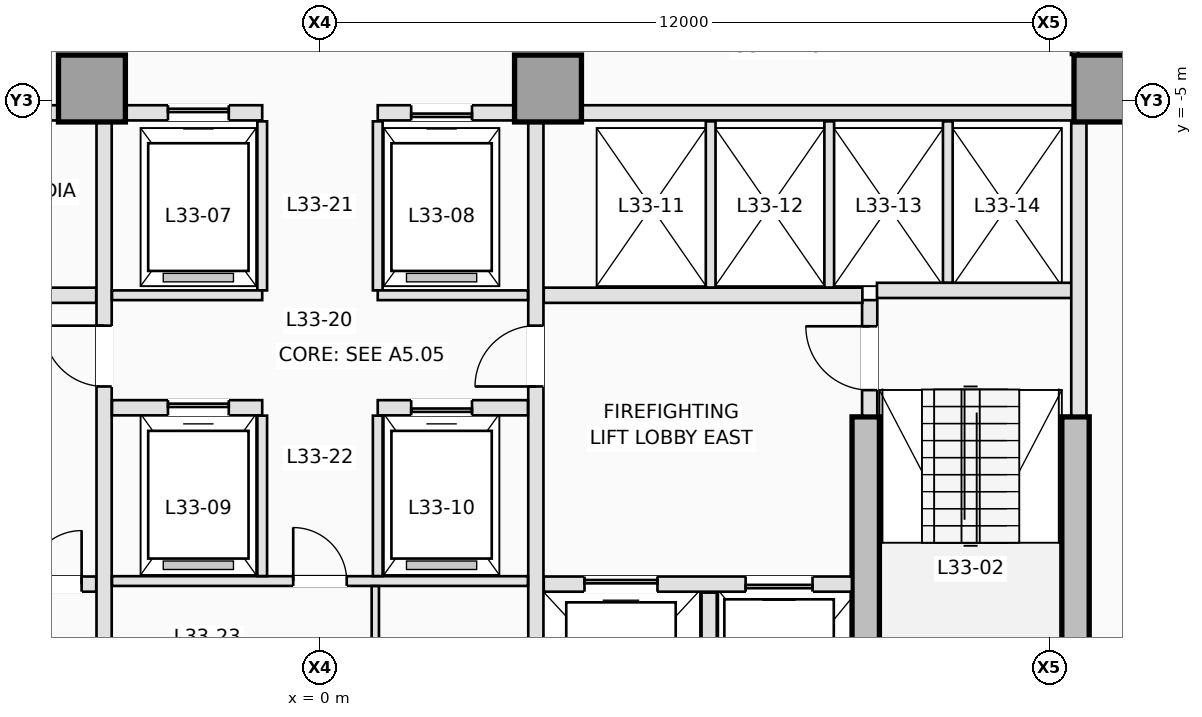
"""IFC4 building model, lengths in metres.
Left out: names, types, materials, properties, quantities, classifications, styles, units other than length and angle.
Written with IfcOpenShell. Run it as: python <this file> out.ifc"""

import sys

from ifc_helpers import new_model, si_unit, direction, frame, frame_2d, origin, origin_2d, place, context, subcontext, project, spatial, rectangle, extrude, element, fill, save


model = new_model("IFC4")
c1 = context("Model", 3, precision=1e-05, world=origin(), true_north=direction((0.0, 1.0)))
c2 = subcontext(c1, "Body", "Model", "MODEL_VIEW")
j1 = project(units=[si_unit("LENGTHUNIT", "METRE"), si_unit("PLANEANGLEUNIT", "RADIAN")], contexts=[c1])
p1 = place(None, origin())
s1 = spatial("IfcSite", under=j1, at=p1, CompositionType="ELEMENT")
p2 = place(p1, origin())
s2 = spatial("IfcBuilding", under=s1, at=p2, CompositionType="ELEMENT")
p3 = place(p2, frame((0.0, 0.0, 123.0)))
s3 = spatial("IfcBuildingStorey", under=s2, at=p3, CompositionType="ELEMENT", Elevation=123.0)
p4 = place(p3, frame((12.425, -15.725, 0.0), z_axis=(0.0, 0.0, 1.0), x_axis=(0.0, 1.0, 0.0)))
e1 = element("IfcWall", 1, at=p4, inside=s3, PredefinedType="SHEAR", context=c2, shape_type="SweptSolid", body=[
    extrude(rectangle(XDim=5.525, YDim=0.45, at=frame_2d((2.763, 0.0))), origin(), (0.0, 0.0, 1.0), 3.5),
])
p5 = place(p3, frame((8.975, -16.15, 0.0), z_axis=(0.0, 0.0, 1.0), x_axis=(0.0, 1.0, 0.0)))
e2 = element("IfcWall", 2, at=p5, inside=s3, PredefinedType="SHEAR", context=c2, shape_type="SweptSolid", body=[
    extrude(rectangle(XDim=5.95, YDim=0.45, at=frame_2d((2.975, 0.0))), origin(), (0.0, 0.0, 1.0), 3.5),
])
for number, where, z_axis, x_axis in (
    (3, (-3.75, -4.8, 0.0), (0.0, 0.0, 1.0), (1.0, 0.0, 0.0)),
    (4, (3.75, -4.8, 0.0), (0.0, 0.0, 1.0), (1.0, 0.0, 0.0)),
    (5, (12.95, -4.8, 0.0), (0.0, 0.0, 1.0), (1.0, 0.0, 0.0)),
):
    element("IfcColumn", number, at=place(p3, frame(where, z_axis=z_axis, x_axis=x_axis)), inside=s3, PredefinedType="COLUMN", context=c2, shape_type="SweptSolid", body=[
        extrude(rectangle(XDim=1.1, YDim=1.1, at=origin_2d()), origin(), (0.0, 0.0, 1.0), 3.5),
    ])
p6 = place(p3, frame((9.04, -10.18, 0.0), z_axis=(0.0, 0.0, 1.0), x_axis=(0.0, 1.0, 0.0)))
e6 = element("IfcWall", 6, at=p6, inside=s3, PredefinedType="PARTITIONING", context=c2, shape_type="SweptSolid", body=[
    extrude(rectangle(XDim=1.9, YDim=0.25, at=frame_2d((0.95, 0.0))), origin(), (0.0, 0.0, 1.0), 3.25),
])
p7 = place(p6, frame((0.42, 0.0, 0.0)))
e7 = element("IfcOpeningElement", 7, at=p7, cuts=e6, PredefinedType="OPENING", context=c2, shape_type="SweptSolid", body=[
    extrude(rectangle(XDim=1.05, YDim=2.15, at=frame_2d((0.525, 1.075))), frame((0.0, 0.135, 0.0), z_axis=(0.0, -1.0, 0.0), x_axis=(1.0, 0.0, 0.0)), (0.0, 0.0, 1.0), 0.27),
])
p8 = place(p3, frame((9.16, -8.12, 0.0), z_axis=(0.0, 0.0, 1.0), x_axis=(1.0, 0.0, 0.0)))
e8 = element("IfcWall", 8, at=p8, inside=s3, PredefinedType="PARTITIONING", context=c2, shape_type="SweptSolid", body=[
    extrude(rectangle(XDim=3.22, YDim=0.25, at=frame_2d((1.61, 0.0))), origin(), (0.0, 0.0, 1.0), 3.25),
])
p9 = place(p3, frame((12.48, -10.18, 0.0), z_axis=(0.0, 0.0, 1.0), x_axis=(0.0, 1.0, 0.0)))
e9 = element("IfcWall", 9, at=p9, inside=s3, PredefinedType="PARTITIONING", context=c2, shape_type="SweptSolid", body=[
    extrude(rectangle(XDim=4.828, YDim=0.25, at=frame_2d((2.414, 0.0))), origin(), (0.0, 0.0, 1.0), 3.25),
])
p10 = place(p3, frame((-8.748, -12.95, 0.0), z_axis=(0.0, 0.0, 1.0), x_axis=(1.0, 0.0, 0.0)))
e10 = element("IfcWall", 10, at=p10, inside=s3, PredefinedType="PARTITIONING", context=c2, shape_type="SweptSolid", body=[
    extrude(rectangle(XDim=5.068, YDim=0.25, at=frame_2d((2.534, 0.0))), origin(), (0.0, 0.0, 1.0), 3.25),
])
p11 = place(p10, frame((0.648, 0.0, 0.0)))
e11 = element("IfcOpeningElement", 11, at=p11, cuts=e10, PredefinedType="OPENING", context=c2, shape_type="SweptSolid", body=[
    extrude(rectangle(XDim=1.1, YDim=2.15, at=frame_2d((0.55, 1.075))), frame((0.0, 0.135, 0.0), z_axis=(0.0, -1.0, 0.0), x_axis=(1.0, 0.0, 0.0)), (0.0, 0.0, 1.0), 0.27),
])
p12 = place(p10, frame((2.548, 0.0, 0.0)))
e12 = element("IfcOpeningElement", 12, at=p12, cuts=e10, PredefinedType="OPENING", context=c2, shape_type="SweptSolid", body=[
    extrude(rectangle(XDim=0.88, YDim=2.1, at=frame_2d((0.44, 1.05))), frame((0.0, 0.135, 0.0), z_axis=(0.0, -1.0, 0.0), x_axis=(1.0, 0.0, 0.0)), (0.0, 0.0, 1.0), 0.27),
])
p13 = place(p10, frame((3.948, 0.0, 0.0)))
e13 = element("IfcOpeningElement", 13, at=p13, cuts=e10, PredefinedType="OPENING", context=c2, shape_type="SweptSolid", body=[
    extrude(rectangle(XDim=0.88, YDim=2.1, at=frame_2d((0.44, 1.05))), frame((0.0, 0.135, 0.0), z_axis=(0.0, -1.0, 0.0), x_axis=(1.0, 0.0, 0.0)), (0.0, 0.0, 1.0), 0.27),
])
p14 = place(p3, frame((3.68, -12.95, 0.0), z_axis=(0.0, 0.0, 1.0), x_axis=(1.0, 0.0, 0.0)))
e14 = element("IfcWall", 14, at=p14, inside=s3, PredefinedType="PARTITIONING", context=c2, shape_type="SweptSolid", body=[
    extrude(rectangle(XDim=5.068, YDim=0.25, at=frame_2d((2.534, 0.0))), origin(), (0.0, 0.0, 1.0), 3.25),
])
p15 = place(p14, frame((3.32, 0.0, 0.0)))
e15 = element("IfcOpeningElement", 15, at=p15, cuts=e14, PredefinedType="OPENING", context=c2, shape_type="SweptSolid", body=[
    extrude(rectangle(XDim=1.1, YDim=2.15, at=frame_2d((0.55, 1.075))), frame((0.0, 0.135, 0.0), z_axis=(0.0, -1.0, 0.0), x_axis=(1.0, 0.0, 0.0)), (0.0, 0.0, 1.0), 0.27),
])
p16 = place(p14, frame((0.67, 0.0, 0.0)))
e16 = element("IfcOpeningElement", 16, at=p16, cuts=e14, PredefinedType="OPENING", context=c2, shape_type="SweptSolid", body=[
    extrude(rectangle(XDim=1.2, YDim=2.15, at=frame_2d((0.6, 1.075))), frame((0.0, 0.135, 0.0), z_axis=(0.0, -1.0, 0.0), x_axis=(1.0, 0.0, 0.0)), (0.0, 0.0, 1.0), 0.27),
])
p17 = place(p3, frame((6.4, -15.92, 0.0), z_axis=(0.0, 0.0, 1.0), x_axis=(0.0, 1.0, 0.0)))
e17 = element("IfcWall", 17, at=p17, inside=s3, PredefinedType="PARTITIONING", context=c2, shape_type="SweptSolid", body=[
    extrude(rectangle(XDim=2.83, YDim=0.25, at=frame_2d((1.415, 0.0))), origin(), (0.0, 0.0, 1.0), 3.25),
])
for number, where, z_axis, x_axis in (
    (18, (-8.92, -8.2, 0.0), (0.0, 0.0, 1.0), (1.0, 0.0, 0.0)),
    (19, (3.68, -8.2, 0.0), (0.0, 0.0, 1.0), (1.0, 0.0, 0.0)),
):
    element("IfcWall", number, at=place(p3, frame(where, z_axis=z_axis, x_axis=x_axis)), inside=s3, PredefinedType="PARTITIONING", context=c2, shape_type="SweptSolid", body=[
        extrude(rectangle(XDim=5.24, YDim=0.25, at=frame_2d((2.62, 0.0))), origin(), (0.0, 0.0, 1.0), 3.25),
    ])
p18 = place(p3, frame((-3.55, -15.798, 0.0), z_axis=(0.0, 0.0, 1.0), x_axis=(0.0, 1.0, 0.0)))
e20 = element("IfcWall", 20, at=p18, inside=s3, PredefinedType="PARTITIONING", context=c2, shape_type="SweptSolid", body=[
    extrude(rectangle(XDim=10.446, YDim=0.25, at=frame_2d((5.223, 0.0))), origin(), (0.0, 0.0, 1.0), 3.25),
])
p19 = place(p18, frame((6.098, 0.0, 0.0)))
e21 = element("IfcOpeningElement", 21, at=p19, cuts=e20, PredefinedType="OPENING", context=c2, shape_type="SweptSolid", body=[
    extrude(rectangle(XDim=1.0, YDim=2.15, at=frame_2d((0.5, 1.075))), frame((0.0, 0.135, 0.0), z_axis=(0.0, -1.0, 0.0), x_axis=(1.0, 0.0, 0.0)), (0.0, 0.0, 1.0), 0.27),
])
p20 = place(p3, frame((3.55, -15.798, 0.0), z_axis=(0.0, 0.0, 1.0), x_axis=(0.0, 1.0, 0.0)))
e22 = element("IfcWall", 22, at=p20, inside=s3, PredefinedType="PARTITIONING", context=c2, shape_type="SweptSolid", body=[
    extrude(rectangle(XDim=10.446, YDim=0.25, at=frame_2d((5.223, 0.0))), origin(), (0.0, 0.0, 1.0), 3.25),
])
p21 = place(p20, frame((6.098, 0.0, 0.0)))
e23 = element("IfcOpeningElement", 23, at=p21, cuts=e22, PredefinedType="OPENING", context=c2, shape_type="SweptSolid", body=[
    extrude(rectangle(XDim=1.0, YDim=2.15, at=frame_2d((0.5, 1.075))), frame((0.0, 0.135, 0.0), z_axis=(0.0, -1.0, 0.0), x_axis=(1.0, 0.0, 0.0)), (0.0, 0.0, 1.0), 0.27),
])
p22 = place(p3, frame((-12.398, -5.2, 0.0), z_axis=(0.0, 0.0, 1.0), x_axis=(1.0, 0.0, 0.0)))
e24 = element("IfcWall", 24, at=p22, inside=s3, PredefinedType="PARTITIONING", context=c2, shape_type="SweptSolid", body=[
    extrude(rectangle(XDim=8.096, YDim=0.25, at=frame_2d((4.048, 0.0))), origin(), (0.0, 0.0, 1.0), 3.25),
])
p23 = place(p22, frame((2.968, 0.0, 0.0)))
e25 = element("IfcOpeningElement", 25, at=p23, cuts=e24, PredefinedType="OPENING", context=c2, shape_type="SweptSolid", body=[
    extrude(rectangle(XDim=0.92, YDim=2.12, at=frame_2d((0.46, 1.06))), frame((0.0, 0.135, 0.0), z_axis=(0.0, -1.0, 0.0), x_axis=(1.0, 0.0, 0.0)), (0.0, 0.0, 1.0), 0.27),
])
p24 = place(p22, frame((6.068, 0.0, 0.0)))
e26 = element("IfcOpeningElement", 26, at=p24, cuts=e24, PredefinedType="OPENING", context=c2, shape_type="SweptSolid", body=[
    extrude(rectangle(XDim=0.92, YDim=2.12, at=frame_2d((0.46, 1.06))), frame((0.0, 0.135, 0.0), z_axis=(0.0, -1.0, 0.0), x_axis=(1.0, 0.0, 0.0)), (0.0, 0.0, 1.0), 0.27),
])
p25 = place(p3, frame((4.302, -5.2, 0.0), z_axis=(0.0, 0.0, 1.0), x_axis=(1.0, 0.0, 0.0)))
e27 = element("IfcWall", 27, at=p25, inside=s3, PredefinedType="PARTITIONING", context=c2, shape_type="SweptSolid", body=[
    extrude(rectangle(XDim=8.096, YDim=0.25, at=frame_2d((4.048, 0.0))), origin(), (0.0, 0.0, 1.0), 3.25),
])
p26 = place(p3, frame((-3.198, -5.2, 0.0), z_axis=(0.0, 0.0, 1.0), x_axis=(1.0, 0.0, 0.0)))
e28 = element("IfcWall", 28, at=p26, inside=s3, PredefinedType="PARTITIONING", context=c2, shape_type="SweptSolid", body=[
    extrude(rectangle(XDim=2.248, YDim=0.25, at=frame_2d((1.124, 0.0))), origin(), (0.0, 0.0, 1.0), 3.25),
])
p27 = place(p26, frame((0.698, 0.0, 0.0)))
e29 = element("IfcOpeningElement", 29, at=p27, cuts=e28, PredefinedType="OPENING", context=c2, shape_type="SweptSolid", body=[
    extrude(rectangle(XDim=1.0, YDim=2.15, at=frame_2d((0.5, 1.075))), frame((0.0, 0.135, 0.0), z_axis=(0.0, -1.0, 0.0), x_axis=(1.0, 0.0, 0.0)), (0.0, 0.0, 1.0), 0.27),
])
p28 = place(p3, frame((0.95, -5.2, 0.0), z_axis=(0.0, 0.0, 1.0), x_axis=(1.0, 0.0, 0.0)))
e30 = element("IfcWall", 30, at=p28, inside=s3, PredefinedType="PARTITIONING", context=c2, shape_type="SweptSolid", body=[
    extrude(rectangle(XDim=2.248, YDim=0.25, at=frame_2d((1.124, 0.0))), origin(), (0.0, 0.0, 1.0), 3.25),
])
p29 = place(p28, frame((0.55, 0.0, 0.0)))
e31 = element("IfcOpeningElement", 31, at=p29, cuts=e30, PredefinedType="OPENING", context=c2, shape_type="SweptSolid", body=[
    extrude(rectangle(XDim=1.0, YDim=2.15, at=frame_2d((0.5, 1.075))), frame((0.0, 0.135, 0.0), z_axis=(0.0, -1.0, 0.0), x_axis=(1.0, 0.0, 0.0)), (0.0, 0.0, 1.0), 0.27),
])
for number, where, z_axis, x_axis in (
    (32, (6.425, -8.073, 0.0), (0.0, 0.0, 1.0), (0.0, 1.0, 0.0)),
    (33, (8.375, -8.073, 0.0), (0.0, 0.0, 1.0), (0.0, 1.0, 0.0)),
):
    element("IfcWall", number, at=place(p3, frame(where, z_axis=z_axis, x_axis=x_axis)), inside=s3, PredefinedType="PARTITIONING", context=c2, shape_type="SweptSolid", body=[
        extrude(rectangle(XDim=2.733, YDim=0.16, at=frame_2d((1.366, 0.0))), origin(), (0.0, 0.0, 1.0), 3.25),
    ])
p30 = place(p3, frame((10.325, -7.993, 0.0), z_axis=(0.0, 0.0, 1.0), x_axis=(0.0, 1.0, 0.0)))
e34 = element("IfcWall", 34, at=p30, inside=s3, PredefinedType="PARTITIONING", context=c2, shape_type="SweptSolid", body=[
    extrude(rectangle(XDim=2.653, YDim=0.16, at=frame_2d((1.326, 0.0))), origin(), (0.0, 0.0, 1.0), 3.25),
])
for number, where, z_axis, x_axis in (
    (35, (-0.95, -8.12, 0.0), (0.0, 0.0, 1.0), (0.0, 1.0, 0.0)),
    (36, (0.95, -8.12, 0.0), (0.0, 0.0, 1.0), (0.0, 1.0, 0.0)),
):
    element("IfcWall", number, at=place(p3, frame(where, z_axis=z_axis, x_axis=x_axis)), inside=s3, PredefinedType="PARTITIONING", context=c2, shape_type="SweptSolid", body=[
        extrude(rectangle(XDim=2.78, YDim=0.16, at=frame_2d((1.39, 0.0))), origin(), (0.0, 0.0, 1.0), 3.25),
    ])
for number, where, z_axis, x_axis in (
    (37, (-3.42, -8.2, 0.0), (0.0, 0.0, 1.0), (1.0, 0.0, 0.0)),
    (38, (0.95, -8.2, 0.0), (0.0, 0.0, 1.0), (1.0, 0.0, 0.0)),
):
    element("IfcWall", number, at=place(p3, frame(where, z_axis=z_axis, x_axis=x_axis)), inside=s3, PredefinedType="PARTITIONING", context=c2, shape_type="SweptSolid", body=[
        extrude(rectangle(XDim=2.47, YDim=0.16, at=frame_2d((1.235, 0.0))), origin(), (0.0, 0.0, 1.0), 3.25),
    ])
p31 = place(p3, frame((-3.42, -10.05, 0.0), z_axis=(0.0, 0.0, 1.0), x_axis=(1.0, 0.0, 0.0)))
e39 = element("IfcWall", 39, at=p31, inside=s3, PredefinedType="PARTITIONING", context=c2, shape_type="SweptSolid", body=[
    extrude(rectangle(XDim=2.47, YDim=0.25, at=frame_2d((1.235, 0.0))), origin(), (0.0, 0.0, 1.0), 3.25),
])
p32 = place(p31, frame((0.92, 0.0, 0.0)))
e40 = element("IfcOpeningElement", 40, at=p32, cuts=e39, PredefinedType="OPENING", context=c2, shape_type="SweptSolid", body=[
    extrude(rectangle(XDim=1.0, YDim=2.15, at=frame_2d((0.5, 1.075))), frame((0.0, 0.135, 0.0), z_axis=(0.0, -1.0, 0.0), x_axis=(1.0, 0.0, 0.0)), (0.0, 0.0, 1.0), 0.27),
])
p33 = place(p3, frame((0.95, -10.05, 0.0), z_axis=(0.0, 0.0, 1.0), x_axis=(1.0, 0.0, 0.0)))
e41 = element("IfcWall", 41, at=p33, inside=s3, PredefinedType="PARTITIONING", context=c2, shape_type="SweptSolid", body=[
    extrude(rectangle(XDim=2.47, YDim=0.25, at=frame_2d((1.235, 0.0))), origin(), (0.0, 0.0, 1.0), 3.25),
])
p34 = place(p33, frame((0.55, 0.0, 0.0)))
e42 = element("IfcOpeningElement", 42, at=p34, cuts=e41, PredefinedType="OPENING", context=c2, shape_type="SweptSolid", body=[
    extrude(rectangle(XDim=1.0, YDim=2.15, at=frame_2d((0.5, 1.075))), frame((0.0, 0.135, 0.0), z_axis=(0.0, -1.0, 0.0), x_axis=(1.0, 0.0, 0.0)), (0.0, 0.0, 1.0), 0.27),
])
p35 = place(p3, frame((-3.42, -12.9, 0.0), z_axis=(0.0, 0.0, 1.0), x_axis=(1.0, 0.0, 0.0)))
e43 = element("IfcWall", 43, at=p35, inside=s3, PredefinedType="PARTITIONING", context=c2, shape_type="SweptSolid", body=[
    extrude(rectangle(XDim=6.84, YDim=0.16, at=frame_2d((3.42, 0.0))), origin(), (0.0, 0.0, 1.0), 3.25),
])
p36 = place(p35, frame((2.98, 0.0, 0.0)))
e44 = element("IfcOpeningElement", 44, at=p36, cuts=e43, PredefinedType="OPENING", context=c2, shape_type="SweptSolid", body=[
    extrude(rectangle(XDim=0.88, YDim=2.12, at=frame_2d((0.44, 1.06))), frame((0.0, 0.09, 0.0), z_axis=(0.0, -1.0, 0.0), x_axis=(1.0, 0.0, 0.0)), (0.0, 0.0, 1.0), 0.18),
])
for number, where, z_axis, x_axis in (
    (45, (-0.95, -12.818, 0.0), (0.0, 0.0, 1.0), (0.0, 1.0, 0.0)),
    (46, (0.95, -12.818, 0.0), (0.0, 0.0, 1.0), (0.0, 1.0, 0.0)),
):
    element("IfcWall", number, at=place(p3, frame(where, z_axis=z_axis, x_axis=x_axis)), inside=s3, PredefinedType="PARTITIONING", context=c2, shape_type="SweptSolid", body=[
        extrude(rectangle(XDim=2.638, YDim=0.16, at=frame_2d((1.319, 0.0))), origin(), (0.0, 0.0, 1.0), 3.25),
    ])
p37 = place(p3, frame((0.91, -16.02, 0.0), z_axis=(0.0, 0.0, 1.0), x_axis=(0.0, 1.0, 0.0)))
e47 = element("IfcWall", 47, at=p37, inside=s3, PredefinedType="PARTITIONING", context=c2, shape_type="SweptSolid", body=[
    extrude(rectangle(XDim=3.038, YDim=0.12, at=frame_2d((1.519, 0.0))), origin(), (0.0, 0.0, 1.0), 3.25),
])
p38 = place(p37, frame((1.05, 0.0, 0.0)))
e48 = element("IfcOpeningElement", 48, at=p38, cuts=e47, PredefinedType="OPENING", context=c2, shape_type="SweptSolid", body=[
    extrude(rectangle(XDim=0.88, YDim=2.12, at=frame_2d((0.44, 1.06))), frame((0.0, 0.07, 0.0), z_axis=(0.0, -1.0, 0.0), x_axis=(1.0, 0.0, 0.0)), (0.0, 0.0, 1.0), 0.14),
])
p39 = place(p3, frame((12.41, -2.462, 0.0), z_axis=(0.0, 0.0, 1.0), x_axis=(0.0, -1.0, 0.0)))
e49 = element("IfcWall", 49, at=p39, inside=s3, PredefinedType="PARTITIONING", context=c2, shape_type="SweptSolid", body=[
    extrude(rectangle(XDim=1.786, YDim=0.12, at=frame_2d((0.893, 0.0))), origin(), (0.0, 0.0, 1.0), 3.25),
])
p40 = place(p39, frame((0.623, 0.0, 0.0)))
e50 = element("IfcOpeningElement", 50, at=p40, cuts=e49, PredefinedType="OPENING", context=c2, shape_type="SweptSolid", body=[
    extrude(rectangle(XDim=0.92, YDim=2.12, at=frame_2d((0.46, 1.06))), frame((0.0, 0.07, 0.0), z_axis=(0.0, -1.0, 0.0), x_axis=(1.0, 0.0, 0.0)), (0.0, 0.0, 1.0), 0.14),
])
p41 = place(p27, origin())
e51 = element("IfcDoor", 51, at=p41, inside=s3, OperationType="SLIDING_TO_LEFT", PredefinedType="DOOR", context=c2, shape_type="SweptSolid", body=[
    extrude(rectangle(XDim=1.0, YDim=2.15, at=frame_2d((0.5, 1.075))), frame((0.0, 0.025, 0.0), z_axis=(0.0, -1.0, 0.0), x_axis=(1.0, 0.0, 0.0)), (0.0, 0.0, 1.0), 0.05),
])
fill(e29, e51)
p42 = place(p29, origin())
e52 = element("IfcDoor", 52, at=p42, inside=s3, OperationType="SLIDING_TO_RIGHT", PredefinedType="DOOR", context=c2, shape_type="SweptSolid", body=[
    extrude(rectangle(XDim=1.0, YDim=2.15, at=frame_2d((0.5, 1.075))), frame((0.0, 0.025, 0.0), z_axis=(0.0, -1.0, 0.0), x_axis=(1.0, 0.0, 0.0)), (0.0, 0.0, 1.0), 0.05),
])
fill(e31, e52)
p43 = place(p15, origin())
e53 = element("IfcDoor", 53, at=p43, inside=s3, OperationType="SLIDING_TO_RIGHT", PredefinedType="DOOR", context=c2, shape_type="SweptSolid", body=[
    extrude(rectangle(XDim=1.1, YDim=2.15, at=frame_2d((0.55, 1.075))), frame((0.0, 0.025, 0.0), z_axis=(0.0, -1.0, 0.0), x_axis=(1.0, 0.0, 0.0)), (0.0, 0.0, 1.0), 0.05),
])
fill(e15, e53)
p44 = place(p16, origin())
e54 = element("IfcDoor", 54, at=p44, inside=s3, OperationType="SLIDING_TO_LEFT", PredefinedType="DOOR", context=c2, shape_type="SweptSolid", body=[
    extrude(rectangle(XDim=1.2, YDim=2.15, at=frame_2d((0.6, 1.075))), frame((0.0, 0.025, 0.0), z_axis=(0.0, -1.0, 0.0), x_axis=(1.0, 0.0, 0.0)), (0.0, 0.0, 1.0), 0.05),
])
fill(e16, e54)
p45 = place(p32, origin())
e55 = element("IfcDoor", 55, at=p45, inside=s3, OperationType="SLIDING_TO_LEFT", PredefinedType="DOOR", context=c2, shape_type="SweptSolid", body=[
    extrude(rectangle(XDim=1.0, YDim=2.15, at=frame_2d((0.5, 1.075))), frame((0.0, 0.025, 0.0), z_axis=(0.0, -1.0, 0.0), x_axis=(1.0, 0.0, 0.0)), (0.0, 0.0, 1.0), 0.05),
])
fill(e40, e55)
p46 = place(p34, origin())
e56 = element("IfcDoor", 56, at=p46, inside=s3, OperationType="SLIDING_TO_RIGHT", PredefinedType="DOOR", context=c2, shape_type="SweptSolid", body=[
    extrude(rectangle(XDim=1.0, YDim=2.15, at=frame_2d((0.5, 1.075))), frame((0.0, 0.025, 0.0), z_axis=(0.0, -1.0, 0.0), x_axis=(1.0, 0.0, 0.0)), (0.0, 0.0, 1.0), 0.05),
])
fill(e42, e56)
p47 = place(p7, origin())
e57 = element("IfcDoor", 57, at=p47, inside=s3, OperationType="SINGLE_SWING_RIGHT", PredefinedType="DOOR", context=c2, shape_type="SweptSolid", body=[
    extrude(rectangle(XDim=1.05, YDim=2.15, at=frame_2d((0.525, 1.075))), frame((0.0, 0.025, 0.0), z_axis=(0.0, -1.0, 0.0), x_axis=(1.0, 0.0, 0.0)), (0.0, 0.0, 1.0), 0.05),
])
fill(e7, e57)
p48 = place(p13, origin())
e58 = element("IfcDoor", 58, at=p48, inside=s3, OperationType="SINGLE_SWING_RIGHT", PredefinedType="TRAPDOOR", context=c2, shape_type="SweptSolid", body=[
    extrude(rectangle(XDim=0.88, YDim=2.1, at=frame_2d((0.44, 1.05))), frame((0.0, 0.025, 0.0), z_axis=(0.0, -1.0, 0.0), x_axis=(1.0, 0.0, 0.0)), (0.0, 0.0, 1.0), 0.05),
])
fill(e13, e58)
p49 = place(p19, origin())
e59 = element("IfcDoor", 59, at=p49, inside=s3, OperationType="SINGLE_SWING_RIGHT", PredefinedType="DOOR", context=c2, shape_type="SweptSolid", body=[
    extrude(rectangle(XDim=1.0, YDim=2.15, at=frame_2d((0.5, 1.075))), frame((0.0, 0.025, 0.0), z_axis=(0.0, -1.0, 0.0), x_axis=(1.0, 0.0, 0.0)), (0.0, 0.0, 1.0), 0.05),
])
fill(e21, e59)
p50 = place(p21, origin())
e60 = element("IfcDoor", 60, at=p50, inside=s3, OperationType="SINGLE_SWING_LEFT", PredefinedType="DOOR", context=c2, shape_type="SweptSolid", body=[
    extrude(rectangle(XDim=1.0, YDim=2.15, at=frame_2d((0.5, 1.075))), frame((0.0, 0.025, 0.0), z_axis=(0.0, -1.0, 0.0), x_axis=(1.0, 0.0, 0.0)), (0.0, 0.0, 1.0), 0.05),
])
fill(e23, e60)
p51 = place(p36, origin())
e61 = element("IfcDoor", 61, at=p51, inside=s3, OperationType="SINGLE_SWING_LEFT", PredefinedType="DOOR", context=c2, shape_type="SweptSolid", body=[
    extrude(rectangle(XDim=0.88, YDim=2.12, at=frame_2d((0.44, 1.06))), frame((0.0, 0.025, 0.0), z_axis=(0.0, -1.0, 0.0), x_axis=(1.0, 0.0, 0.0)), (0.0, 0.0, 1.0), 0.05),
])
fill(e44, e61)
save(model, sys.argv[1])
